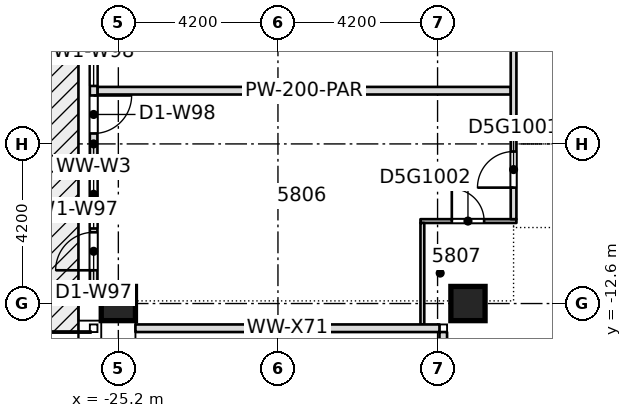
"""IFC4 building model, lengths in metres.
Left out: names, types, materials, properties, quantities, classifications, styles, units other than length and angle.
Written with IfcOpenShell. Run it as: python <this file> out.ifc"""

import sys

from ifc_helpers import new_model, si_unit, direction, frame, frame_2d, origin, origin_2d, place, context, subcontext, project, spatial, rectangle, extrude, element, fill, save


model = new_model("IFC4")
c1 = context("Model", 3, precision=1e-05, world=origin(), true_north=direction((0.0, 1.0)))
c2 = subcontext(c1, "Body", "Model", "MODEL_VIEW")
j1 = project(units=[si_unit("LENGTHUNIT", "METRE"), si_unit("PLANEANGLEUNIT", "RADIAN")], contexts=[c1])
p1 = place(None, origin())
s1 = spatial("IfcSite", under=j1, at=p1, CompositionType="ELEMENT")
p2 = place(p1, origin())
s2 = spatial("IfcBuilding", under=s1, at=p2, CompositionType="ELEMENT")
p3 = place(p2, frame((0.0, 0.0, 223.45)))
s3 = spatial("IfcBuildingStorey", under=s2, at=p3, CompositionType="ELEMENT", Elevation=223.45)
for number, where, z_axis, x_axis in (
    (1, (-25.2, -12.6, -0.4), (0.0, 0.0, 1.0), (1.0, 0.0, 0.0)),
    (2, (-16.0, -12.6, -0.4), (0.0, 0.0, 1.0), (1.0, 0.0, 0.0)),
):
    element("IfcColumn", number, at=place(p3, frame(where, z_axis=z_axis, x_axis=x_axis)), inside=s3, PredefinedType="COLUMN", context=c2, shape_type="SweptSolid", body=[
        extrude(rectangle(XDim=0.9, YDim=0.9, at=origin_2d()), origin(), (0.0, 0.0, 1.0), 3.45),
    ])
p4 = place(p3, frame((-17.25, -10.43, 0.0), z_axis=(0.0, 0.0, 1.0), x_axis=(1.0, 0.0, 0.0)))
e3 = element("IfcWall", 3, at=p4, inside=s3, PredefinedType="PARTITIONING", context=c2, shape_type="SweptSolid", body=[
    extrude(rectangle(XDim=2.525, YDim=0.1, at=frame_2d((1.262, 0.0))), origin(), (0.0, 0.0, 1.0), 3.05),
])
p5 = place(p4, frame((0.825, 0.0, 0.0)))
e4 = element("IfcOpeningElement", 4, at=p5, cuts=e3, PredefinedType="OPENING", context=c2, shape_type="SweptSolid", body=[
    extrude(rectangle(XDim=0.85, YDim=2.1, at=frame_2d((0.425, 1.05))), frame((0.0, 0.06, 0.0), z_axis=(0.0, -1.0, 0.0), x_axis=(1.0, 0.0, 0.0)), (0.0, 0.0, 1.0), 0.12),
])
p6 = place(p3, frame((-25.75, -7.0, 0.0), z_axis=(0.0, 0.0, 1.0), x_axis=(1.0, 0.0, 0.0)))
e5 = element("IfcWall", 5, at=p6, inside=s3, PredefinedType="PARTITIONING", context=c2, shape_type="SweptSolid", body=[
    extrude(rectangle(XDim=10.875, YDim=0.2, at=frame_2d((5.438, 0.0))), origin(), (0.0, 0.0, 1.0), 3.05),
])
p7 = place(p3, frame((-17.2, -13.15, 0.0), z_axis=(0.0, 0.0, 1.0), x_axis=(0.0, 1.0, 0.0)))
e6 = element("IfcWall", 6, at=p7, inside=s3, PredefinedType="PARTITIONING", context=c2, shape_type="SweptSolid", body=[
    extrude(rectangle(XDim=2.67, YDim=0.1, at=frame_2d((1.335, 0.0))), origin(), (0.0, 0.0, 1.0), 3.05),
])
p8 = place(p3, frame((-14.8, -10.38, 0.0), z_axis=(0.0, 0.0, 1.0), x_axis=(0.0, 1.0, 0.0)))
e7 = element("IfcWall", 7, at=p8, inside=s3, PredefinedType="PARTITIONING", context=c2, shape_type="SweptSolid", body=[
    extrude(rectangle(XDim=20.805, YDim=0.15, at=frame_2d((10.402, 0.0))), origin(), (0.0, 0.0, 1.0), 3.05),
])
p9 = place(p8, frame((0.83, 0.0, 0.0)))
e8 = element("IfcOpeningElement", 8, at=p9, cuts=e7, PredefinedType="OPENING", context=c2, shape_type="SweptSolid", body=[
    extrude(rectangle(XDim=0.95, YDim=2.1, at=frame_2d((0.475, 1.05))), frame((0.0, 0.085, 0.0), z_axis=(0.0, -1.0, 0.0), x_axis=(1.0, 0.0, 0.0)), (0.0, 0.0, 1.0), 0.17),
])
p10 = place(p8, frame((9.83, 0.0, 0.0)))
e9 = element("IfcOpeningElement", 9, at=p10, cuts=e7, PredefinedType="OPENING", context=c2, shape_type="SweptSolid", body=[
    extrude(rectangle(XDim=1.1, YDim=2.1, at=frame_2d((0.55, 1.05))), frame((0.0, 0.085, 0.0), z_axis=(0.0, -1.0, 0.0), x_axis=(1.0, 0.0, 0.0)), (0.0, 0.0, 1.0), 0.17),
])
p11 = place(p8, frame((4.68, 0.0, 0.0)))
e10 = element("IfcOpeningElement", 10, at=p11, cuts=e7, PredefinedType="OPENING", context=c2, shape_type="SweptSolid", body=[
    extrude(rectangle(XDim=1.0, YDim=2.1, at=frame_2d((0.5, 1.05))), frame((0.0, 0.085, 0.0), z_axis=(0.0, -1.0, 0.0), x_axis=(1.0, 0.0, 0.0)), (0.0, 0.0, 1.0), 0.17),
])
p12 = place(p3, frame((-25.85, -4.65, 0.0), z_axis=(0.0, 0.0, 1.0), x_axis=(0.0, -1.0, 0.0)))
e11 = element("IfcWall", 11, at=p12, inside=s3, PredefinedType="STANDARD", context=c2, shape_type="SweptSolid", body=[
    extrude(rectangle(XDim=7.5, YDim=0.2, at=frame_2d((3.75, 0.0))), origin(), (0.0, 0.0, 1.0), 3.05),
])
p13 = place(p12, frame((4.175, 0.0, 0.2)))
e12 = element("IfcOpeningElement", 12, at=p13, cuts=e11, PredefinedType="OPENING", context=c2, shape_type="SweptSolid", body=[
    extrude(rectangle(XDim=1.8, YDim=2.65, at=frame_2d((0.9, 1.325))), frame((0.0, 0.11, 0.0), z_axis=(0.0, -1.0, 0.0), x_axis=(1.0, 0.0, 0.0)), (0.0, 0.0, 1.0), 0.22),
])
p14 = place(p12, frame((6.075, 0.0, 0.0)))
e13 = element("IfcOpeningElement", 13, at=p14, cuts=e11, PredefinedType="OPENING", context=c2, shape_type="SweptSolid", body=[
    extrude(rectangle(XDim=1.0, YDim=2.4, at=frame_2d((0.5, 1.2))), frame((0.0, 0.11, 0.0), z_axis=(0.0, -1.0, 0.0), x_axis=(1.0, 0.0, 0.0)), (0.0, 0.0, 1.0), 0.22),
])
p15 = place(p12, frame((0.425, 0.0, 0.2)))
e14 = element("IfcOpeningElement", 14, at=p15, cuts=e11, PredefinedType="OPENING", context=c2, shape_type="SweptSolid", body=[
    extrude(rectangle(XDim=1.8, YDim=2.65, at=frame_2d((0.9, 1.325))), frame((0.0, 0.11, 0.0), z_axis=(0.0, -1.0, 0.0), x_axis=(1.0, 0.0, 0.0)), (0.0, 0.0, 1.0), 0.22),
])
p16 = place(p12, frame((2.475, 0.0, 0.0)))
e15 = element("IfcOpeningElement", 15, at=p16, cuts=e11, PredefinedType="OPENING", context=c2, shape_type="SweptSolid", body=[
    extrude(rectangle(XDim=1.0, YDim=2.4, at=frame_2d((0.5, 1.2))), frame((0.0, 0.11, 0.0), z_axis=(0.0, -1.0, 0.0), x_axis=(1.0, 0.0, 0.0)), (0.0, 0.0, 1.0), 0.22),
])
p17 = place(p3, frame((-24.75, -13.25, 0.0), z_axis=(0.0, 0.0, 1.0), x_axis=(1.0, 0.0, 0.0)))
e16 = element("IfcWall", 16, at=p17, inside=s3, PredefinedType="STANDARD", context=c2, shape_type="SweptSolid", body=[
    extrude(rectangle(XDim=8.0, YDim=0.2, at=frame_2d((4.0, 0.0))), origin(), (0.0, 0.0, 1.0), 3.05),
])
p18 = place(p3, frame((-16.65, -13.35, 0.0), z_axis=(0.0, 0.0, 1.0), x_axis=(0.0, -1.0, 0.0)))
e17 = element("IfcWall", 17, at=p18, inside=s3, PredefinedType="STANDARD", context=c2, shape_type="SweptSolid", body=[
    extrude(rectangle(XDim=7.2, YDim=0.2, at=frame_2d((3.6, 0.0))), origin(), (0.0, 0.0, 1.0), 3.05),
])
p19 = place(p18, frame((3.875, 0.0, 0.2)))
e18 = element("IfcOpeningElement", 18, at=p19, cuts=e17, PredefinedType="OPENING", context=c2, shape_type="SweptSolid", body=[
    extrude(rectangle(XDim=1.8, YDim=2.65, at=frame_2d((0.9, 1.325))), frame((0.0, 0.11, 0.0), z_axis=(0.0, -1.0, 0.0), x_axis=(1.0, 0.0, 0.0)), (0.0, 0.0, 1.0), 0.22),
])
p20 = place(p18, frame((0.275, 0.0, 0.2)))
e19 = element("IfcOpeningElement", 19, at=p20, cuts=e17, PredefinedType="OPENING", context=c2, shape_type="SweptSolid", body=[
    extrude(rectangle(XDim=1.8, YDim=2.65, at=frame_2d((0.9, 1.325))), frame((0.0, 0.11, 0.0), z_axis=(0.0, -1.0, 0.0), x_axis=(1.0, 0.0, 0.0)), (0.0, 0.0, 1.0), 0.22),
])
p21 = place(p9, origin())
e20 = element("IfcDoor", 20, at=p21, inside=s3, OperationType="SINGLE_SWING_LEFT", PredefinedType="DOOR", context=c2, shape_type="SweptSolid", body=[
    extrude(rectangle(XDim=0.95, YDim=2.1, at=frame_2d((0.475, 1.05))), frame((0.0, 0.025, 0.0), z_axis=(0.0, -1.0, 0.0), x_axis=(1.0, 0.0, 0.0)), (0.0, 0.0, 1.0), 0.05),
])
fill(e8, e20)
p22 = place(p5, origin())
e21 = element("IfcDoor", 21, at=p22, inside=s3, OperationType="SINGLE_SWING_RIGHT", PredefinedType="DOOR", context=c2, shape_type="SweptSolid", body=[
    extrude(rectangle(XDim=0.85, YDim=2.1, at=frame_2d((0.425, 1.05))), frame((0.0, 0.025, 0.0), z_axis=(0.0, -1.0, 0.0), x_axis=(1.0, 0.0, 0.0)), (0.0, 0.0, 1.0), 0.05),
])
fill(e4, e21)
p23 = place(p13, origin())
e22 = element("IfcWindow", 22, at=p23, inside=s3, PartitioningType="SINGLE_PANEL", PredefinedType="WINDOW", context=c2, shape_type="SweptSolid", body=[
    extrude(rectangle(XDim=1.8, YDim=2.65, at=frame_2d((0.9, 1.325))), frame((0.0, 0.03, 0.0), z_axis=(0.0, -1.0, 0.0), x_axis=(1.0, 0.0, 0.0)), (0.0, 0.0, 1.0), 0.06),
])
fill(e12, e22)
p24 = place(p14, origin())
e23 = element("IfcDoor", 23, at=p24, inside=s3, OperationType="SINGLE_SWING_LEFT", PredefinedType="DOOR", context=c2, shape_type="SweptSolid", body=[
    extrude(rectangle(XDim=1.0, YDim=2.4, at=frame_2d((0.5, 1.2))), frame((0.0, 0.025, 0.0), z_axis=(0.0, -1.0, 0.0), x_axis=(1.0, 0.0, 0.0)), (0.0, 0.0, 1.0), 0.05),
])
fill(e13, e23)
p25 = place(p15, origin())
e24 = element("IfcWindow", 24, at=p25, inside=s3, PartitioningType="SINGLE_PANEL", PredefinedType="WINDOW", context=c2, shape_type="SweptSolid", body=[
    extrude(rectangle(XDim=1.8, YDim=2.65, at=frame_2d((0.9, 1.325))), frame((0.0, 0.03, 0.0), z_axis=(0.0, -1.0, 0.0), x_axis=(1.0, 0.0, 0.0)), (0.0, 0.0, 1.0), 0.06),
])
fill(e14, e24)
p26 = place(p16, origin())
e25 = element("IfcDoor", 25, at=p26, inside=s3, OperationType="SINGLE_SWING_LEFT", PredefinedType="DOOR", context=c2, shape_type="SweptSolid", body=[
    extrude(rectangle(XDim=1.0, YDim=2.4, at=frame_2d((0.5, 1.2))), frame((0.0, 0.025, 0.0), z_axis=(0.0, -1.0, 0.0), x_axis=(1.0, 0.0, 0.0)), (0.0, 0.0, 1.0), 0.05),
])
fill(e15, e25)
save(model, sys.argv[1])
